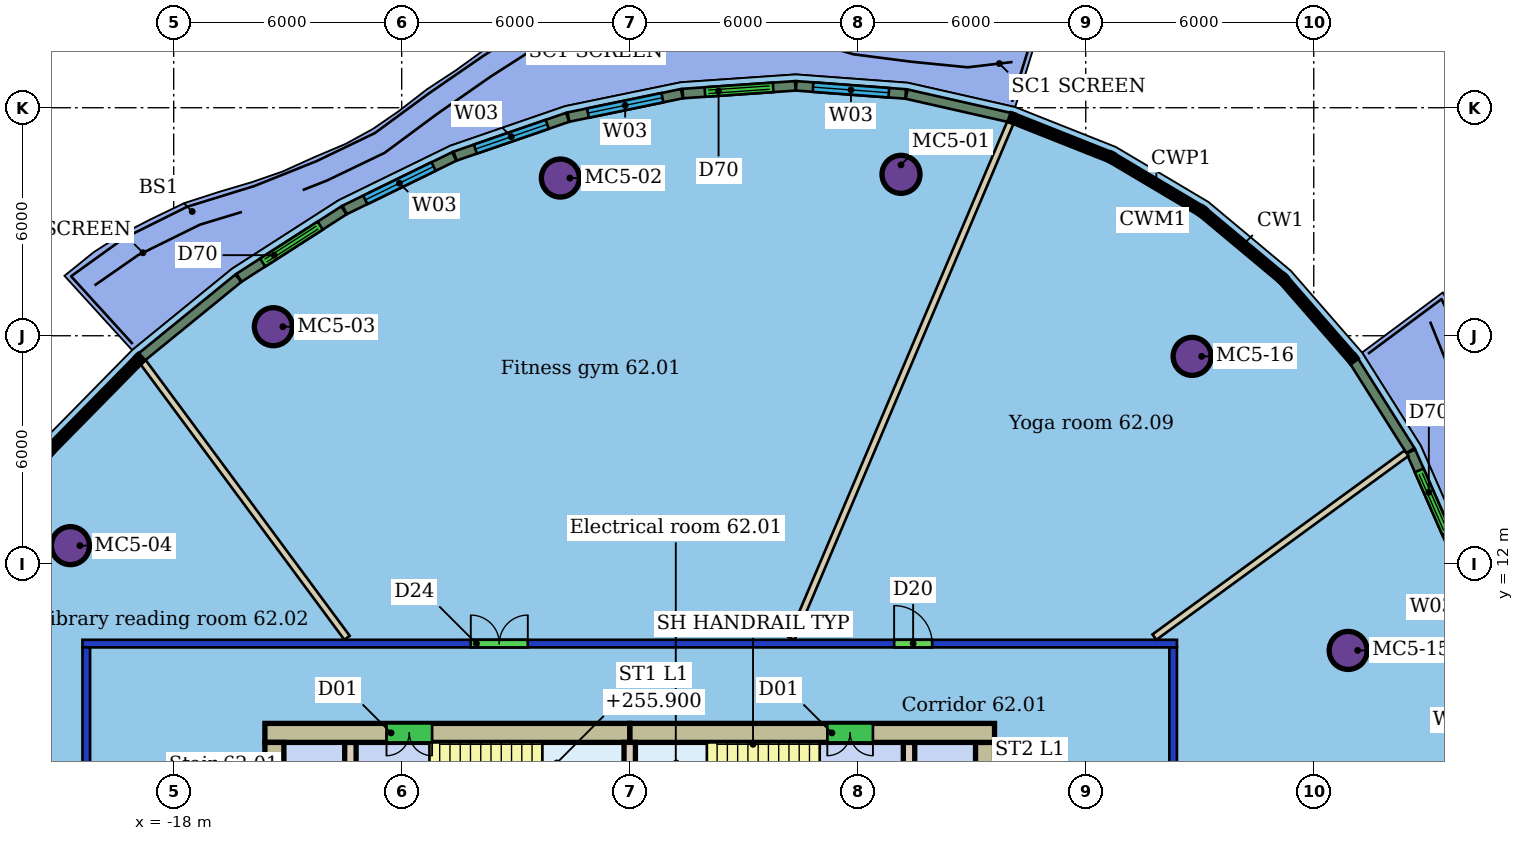
"""IFC4 building model, lengths in metres.
Left out: names, types, materials, properties, quantities, classifications, styles, units other than length and angle.
Written with IfcOpenShell. Run it as: python <this file> out.ifc"""

import sys

from ifc_helpers import new_model, si_unit, direction, frame, frame_2d, origin, origin_2d, place, context, subcontext, project, spatial, rectangle, hollow_circle, extrude, element, fill, save


model = new_model("IFC4")
c1 = context("Model", 3, precision=1e-05, world=origin(), true_north=direction((0.0, 1.0)))
c2 = subcontext(c1, "Body", "Model", "MODEL_VIEW")
j1 = project(units=[si_unit("LENGTHUNIT", "METRE"), si_unit("PLANEANGLEUNIT", "RADIAN")], contexts=[c1])
p1 = place(None, origin())
s1 = spatial("IfcSite", under=j1, at=p1, CompositionType="ELEMENT")
p2 = place(p1, origin())
s2 = spatial("IfcBuilding", under=s1, at=p2, CompositionType="ELEMENT")
p3 = place(p2, frame((0.0, 0.0, 254.1)))
s3 = spatial("IfcBuildingStorey", under=s2, at=p3, CompositionType="ELEMENT", Elevation=254.1)
for number, where, z_axis, x_axis in (
    (1, (1.138, 22.247, 0.0), (0.0, 0.0, 1.0), (1.0, 0.0, 0.0)),
    (2, (-7.825, 22.149, 0.0), (0.0, 0.0, 1.0), (1.0, 0.0, 0.0)),
    (3, (-15.377, 18.238, 0.0), (0.0, 0.0, 1.0), (1.0, 0.0, 0.0)),
    (4, (-20.718, 12.477, 0.0), (0.0, 0.0, 1.0), (1.0, 0.0, 0.0)),
    (5, (12.906, 9.72, 0.0), (0.0, 0.0, 1.0), (1.0, 0.0, 0.0)),
    (6, (8.8, 17.457, 0.0), (0.0, 0.0, 1.0), (1.0, 0.0, 0.0)),
):
    element("IfcColumn", number, at=place(p3, frame(where, z_axis=z_axis, x_axis=x_axis)), inside=s3, PredefinedType="COLUMN", context=c2, shape_type="SweptSolid", body=[
        extrude(hollow_circle(Radius=0.5, WallThickness=0.04, at=origin_2d()), origin(), (0.0, 0.0, 1.0), 3.45),
    ])
p4 = place(p3, frame((-20.3, -9.8, 0.0), z_axis=(0.0, 0.0, 1.0), x_axis=(0.0, 1.0, 0.0)))
e7 = element("IfcWall", 7, at=p4, inside=s3, PredefinedType="PARTITIONING", context=c2, shape_type="SweptSolid", body=[
    extrude(rectangle(XDim=19.6, YDim=0.2, at=frame_2d((9.8, 0.0))), origin(), (0.0, 0.0, 1.0), 3.1),
])
p5 = place(p4, frame((14.022, 0.0, 0.0)))
e8 = element("IfcOpeningElement", 8, at=p5, cuts=e7, PredefinedType="OPENING", context=c2, shape_type="SweptSolid", body=[
    extrude(rectangle(XDim=1.5, YDim=2.1, at=frame_2d((0.75, 1.05))), frame((0.0, 0.11, 0.0), z_axis=(0.0, -1.0, 0.0), x_axis=(1.0, 0.0, 0.0)), (0.0, 0.0, 1.0), 0.22),
])
p6 = place(p4, frame((6.812, 0.0, 0.0)))
e9 = element("IfcOpeningElement", 9, at=p6, cuts=e7, PredefinedType="OPENING", context=c2, shape_type="SweptSolid", body=[
    extrude(rectangle(XDim=1.8, YDim=2.4, at=frame_2d((0.9, 1.2))), frame((0.0, 0.11, 0.0), z_axis=(0.0, -1.0, 0.0), x_axis=(1.0, 0.0, 0.0)), (0.0, 0.0, 1.0), 0.22),
])
p7 = place(p3, frame((-20.4, 9.9, 0.0), z_axis=(0.0, 0.0, 1.0), x_axis=(1.0, 0.0, 0.0)))
e10 = element("IfcWall", 10, at=p7, inside=s3, PredefinedType="PARTITIONING", context=c2, shape_type="SweptSolid", body=[
    extrude(rectangle(XDim=28.8, YDim=0.2, at=frame_2d((14.4, 0.0))), origin(), (0.0, 0.0, 1.0), 3.1),
])
p8 = place(p7, frame((10.218, 0.0, 0.0)))
e11 = element("IfcOpeningElement", 11, at=p8, cuts=e10, PredefinedType="OPENING", context=c2, shape_type="SweptSolid", body=[
    extrude(rectangle(XDim=1.5, YDim=2.1, at=frame_2d((0.75, 1.05))), frame((0.0, 0.11, 0.0), z_axis=(0.0, -1.0, 0.0), x_axis=(1.0, 0.0, 0.0)), (0.0, 0.0, 1.0), 0.22),
])
p9 = place(p7, frame((21.358, 0.0, 0.0)))
e12 = element("IfcOpeningElement", 12, at=p9, cuts=e10, PredefinedType="OPENING", context=c2, shape_type="SweptSolid", body=[
    extrude(rectangle(XDim=1.0, YDim=2.1, at=frame_2d((0.5, 1.05))), frame((0.0, 0.11, 0.0), z_axis=(0.0, -1.0, 0.0), x_axis=(1.0, 0.0, 0.0)), (0.0, 0.0, 1.0), 0.22),
])
p10 = place(p3, frame((8.3, 9.8, 0.0), z_axis=(0.0, 0.0, 1.0), x_axis=(0.0, -1.0, 0.0)))
e13 = element("IfcWall", 13, at=p10, inside=s3, PredefinedType="PARTITIONING", context=c2, shape_type="SweptSolid", body=[
    extrude(rectangle(XDim=19.6, YDim=0.2, at=frame_2d((9.8, 0.0))), origin(), (0.0, 0.0, 1.0), 3.1),
])
p11 = place(p10, frame((10.302, 0.0, 0.0)))
e14 = element("IfcOpeningElement", 14, at=p11, cuts=e13, PredefinedType="OPENING", context=c2, shape_type="SweptSolid", body=[
    extrude(rectangle(XDim=1.8, YDim=2.1, at=frame_2d((0.9, 1.05))), frame((0.0, 0.11, 0.0), z_axis=(0.0, -1.0, 0.0), x_axis=(1.0, 0.0, 0.0)), (0.0, 0.0, 1.0), 0.22),
])
p12 = place(p3, frame((4.018, 23.611, 0.0), z_axis=(0.0, 0.0, 1.0), x_axis=(-0.390584280832, -0.920567172762, 0.0)))
e15 = element("IfcWall", 15, at=p12, inside=s3, PredefinedType="PARTITIONING", context=c2, shape_type="SweptSolid", body=[
    extrude(rectangle(XDim=14.748, YDim=0.175, at=frame_2d((7.374, 0.0))), origin(), (0.0, 0.0, 1.0), 3.45),
])
p13 = place(p3, frame((-18.807, 17.308, 0.0), z_axis=(0.0, 0.0, 1.0), x_axis=(0.594811545717, -0.803865178423, 0.0)))
e16 = element("IfcWall", 16, at=p13, inside=s3, PredefinedType="PARTITIONING", context=c2, shape_type="SweptSolid", body=[
    extrude(rectangle(XDim=9.026, YDim=0.175, at=frame_2d((4.513, 0.0))), origin(), (0.0, 0.0, 1.0), 3.45),
])
p14 = place(p3, frame((14.44, 14.909, 0.0), z_axis=(0.0, 0.0, 1.0), x_axis=(-0.807914917883, -0.589299147685, 0.0)))
e17 = element("IfcWall", 17, at=p14, inside=s3, PredefinedType="PARTITIONING", context=c2, shape_type="SweptSolid", body=[
    extrude(rectangle(XDim=8.21, YDim=0.175, at=frame_2d((4.105, 0.0))), origin(), (0.0, 0.0, 1.0), 3.45),
])
p15 = place(p3, frame((4.001, 23.743, 0.0), z_axis=(0.0, 0.0, 1.0), x_axis=(-0.975244788098, 0.221128024654, 0.0)))
e18 = element("IfcWall", 18, at=p15, inside=s3, PredefinedType="SOLIDWALL", context=c2, shape_type="SweptSolid", body=[
    extrude(rectangle(XDim=2.782, YDim=0.25, at=frame_2d((1.391, 0.0))), origin(), (0.0, 0.0, 1.0), 3.15),
])
p16 = place(p3, frame((1.261, 24.362, 0.0), z_axis=(0.0, 0.0, 1.0), x_axis=(-0.997260599476, 0.073968214338, 0.0)))
e19 = element("IfcWall", 19, at=p16, inside=s3, PredefinedType="SOLIDWALL", context=c2, shape_type="SweptSolid", body=[
    extrude(rectangle(XDim=2.888, YDim=0.25, at=frame_2d((1.444, 0.0))), origin(), (0.0, 0.0, 1.0), 3.15),
])
p17 = place(p16, frame((0.444, 0.0, 0.9)))
e20 = element("IfcOpeningElement", 20, at=p17, cuts=e19, PredefinedType="OPENING", context=c2, shape_type="SweptSolid", body=[
    extrude(rectangle(XDim=2.0, YDim=2.1, at=frame_2d((1.0, 1.05))), frame((0.0, 0.135, 0.0), z_axis=(0.0, -1.0, 0.0), x_axis=(1.0, 0.0, 0.0)), (0.0, 0.0, 1.0), 0.27),
])
p18 = place(p3, frame((-1.645, 24.575, 0.0), z_axis=(0.0, 0.0, 1.0), x_axis=(-0.99766702353, -0.068267929221, 0.0)))
e21 = element("IfcWall", 21, at=p18, inside=s3, PredefinedType="SOLIDWALL", context=c2, shape_type="SweptSolid", body=[
    extrude(rectangle(XDim=2.965, YDim=0.25, at=frame_2d((1.482, 0.0))), origin(), (0.0, 0.0, 1.0), 3.15),
])
p19 = place(p18, frame((0.582, 0.0, 0.0)))
e22 = element("IfcOpeningElement", 22, at=p19, cuts=e21, PredefinedType="OPENING", context=c2, shape_type="SweptSolid", body=[
    extrude(rectangle(XDim=1.8, YDim=2.4, at=frame_2d((0.9, 1.2))), frame((0.0, 0.135, 0.0), z_axis=(0.0, -1.0, 0.0), x_axis=(1.0, 0.0, 0.0)), (0.0, 0.0, 1.0), 0.27),
])
p20 = place(p3, frame((-4.627, 24.37, 0.0), z_axis=(0.0, 0.0, 1.0), x_axis=(-0.979363870878, -0.202104944072, 0.0)))
e23 = element("IfcWall", 23, at=p20, inside=s3, PredefinedType="SOLIDWALL", context=c2, shape_type="SweptSolid", body=[
    extrude(rectangle(XDim=3.048, YDim=0.25, at=frame_2d((1.524, 0.0))), origin(), (0.0, 0.0, 1.0), 3.15),
])
p21 = place(p20, frame((0.524, 0.0, 0.9)))
e24 = element("IfcOpeningElement", 24, at=p21, cuts=e23, PredefinedType="OPENING", context=c2, shape_type="SweptSolid", body=[
    extrude(rectangle(XDim=2.0, YDim=2.1, at=frame_2d((1.0, 1.05))), frame((0.0, 0.135, 0.0), z_axis=(0.0, -1.0, 0.0), x_axis=(1.0, 0.0, 0.0)), (0.0, 0.0, 1.0), 0.27),
])
p22 = place(p3, frame((-7.635, 23.747, 0.0), z_axis=(0.0, 0.0, 1.0), x_axis=(-0.945414397725, -0.325870551867, 0.0)))
e25 = element("IfcWall", 25, at=p22, inside=s3, PredefinedType="SOLIDWALL", context=c2, shape_type="SweptSolid", body=[
    extrude(rectangle(XDim=3.132, YDim=0.25, at=frame_2d((1.566, 0.0))), origin(), (0.0, 0.0, 1.0), 3.15),
])
p23 = place(p22, frame((0.566, 0.0, 0.9)))
e26 = element("IfcOpeningElement", 26, at=p23, cuts=e25, PredefinedType="OPENING", context=c2, shape_type="SweptSolid", body=[
    extrude(rectangle(XDim=2.0, YDim=2.1, at=frame_2d((1.0, 1.05))), frame((0.0, 0.135, 0.0), z_axis=(0.0, -1.0, 0.0), x_axis=(1.0, 0.0, 0.0)), (0.0, 0.0, 1.0), 0.27),
])
p24 = place(p3, frame((-10.617, 22.718, 0.0), z_axis=(0.0, 0.0, 1.0), x_axis=(-0.898675594267, -0.438613926214, 0.0)))
e27 = element("IfcWall", 27, at=p24, inside=s3, PredefinedType="SOLIDWALL", context=c2, shape_type="SweptSolid", body=[
    extrude(rectangle(XDim=3.21, YDim=0.25, at=frame_2d((1.605, 0.0))), origin(), (0.0, 0.0, 1.0), 3.15),
])
p25 = place(p24, frame((0.605, 0.0, 0.9)))
e28 = element("IfcOpeningElement", 28, at=p25, cuts=e27, PredefinedType="OPENING", context=c2, shape_type="SweptSolid", body=[
    extrude(rectangle(XDim=2.0, YDim=2.1, at=frame_2d((1.0, 1.05))), frame((0.0, 0.135, 0.0), z_axis=(0.0, -1.0, 0.0), x_axis=(1.0, 0.0, 0.0)), (0.0, 0.0, 1.0), 0.27),
])
p26 = place(p3, frame((-13.522, 21.299, 0.0), z_axis=(0.0, 0.0, 1.0), x_axis=(-0.841357447224, -0.540479089328, 0.0)))
e29 = element("IfcWall", 29, at=p26, inside=s3, PredefinedType="SOLIDWALL", context=c2, shape_type="SweptSolid", body=[
    extrude(rectangle(XDim=3.279, YDim=0.25, at=frame_2d((1.64, 0.0))), origin(), (0.0, 0.0, 1.0), 3.15),
])
p27 = place(p26, frame((0.74, 0.0, 0.0)))
e30 = element("IfcOpeningElement", 30, at=p27, cuts=e29, PredefinedType="OPENING", context=c2, shape_type="SweptSolid", body=[
    extrude(rectangle(XDim=1.8, YDim=2.4, at=frame_2d((0.9, 1.2))), frame((0.0, 0.135, 0.0), z_axis=(0.0, -1.0, 0.0), x_axis=(1.0, 0.0, 0.0)), (0.0, 0.0, 1.0), 0.27),
])
p28 = place(p3, frame((-16.298, 19.513, 0.0), z_axis=(0.0, 0.0, 1.0), x_axis=(-0.775212105866, -0.631701029696, 0.0)))
e31 = element("IfcWall", 31, at=p28, inside=s3, PredefinedType="SOLIDWALL", context=c2, shape_type="SweptSolid", body=[
    extrude(rectangle(XDim=3.29, YDim=0.25, at=frame_2d((1.645, 0.0))), origin(), (0.0, 0.0, 1.0), 3.15),
])
p29 = place(p3, frame((15.716, 12.311, 0.0), z_axis=(0.0, 0.0, 1.0), x_axis=(-0.401639105758, 0.915798028348, 0.0)))
e32 = element("IfcWall", 32, at=p29, inside=s3, PredefinedType="SOLIDWALL", context=c2, shape_type="SweptSolid", body=[
    extrude(rectangle(XDim=2.888, YDim=0.25, at=frame_2d((1.444, 0.0))), origin(), (0.0, 0.0, 1.0), 3.15),
])
p30 = place(p29, frame((0.544, 0.0, 0.0)))
e33 = element("IfcOpeningElement", 33, at=p30, cuts=e32, PredefinedType="OPENING", context=c2, shape_type="SweptSolid", body=[
    extrude(rectangle(XDim=1.8, YDim=2.4, at=frame_2d((0.9, 1.2))), frame((0.0, 0.135, 0.0), z_axis=(0.0, -1.0, 0.0), x_axis=(1.0, 0.0, 0.0)), (0.0, 0.0, 1.0), 0.27),
])
p31 = place(p3, frame((14.544, 14.979, 0.0), z_axis=(0.0, 0.0, 1.0), x_axis=(-0.533094811272, 0.846055507751, 0.0)))
e34 = element("IfcWall", 34, at=p31, inside=s3, PredefinedType="SOLIDWALL", context=c2, shape_type="SweptSolid", body=[
    extrude(rectangle(XDim=2.783, YDim=0.25, at=frame_2d((1.391, 0.0))), origin(), (0.0, 0.0, 1.0), 3.15),
])
p32 = place(p3, frame((3.6, 7.55, 0.0), z_axis=(0.0, 0.0, 1.0), x_axis=(-1.0, 0.0, 0.0)))
e35 = element("IfcWall", 35, at=p32, inside=s3, PredefinedType="SHEAR", context=c2, shape_type="SweptSolid", body=[
    extrude(rectangle(XDim=9.6, YDim=0.5, at=frame_2d((4.8, 0.0))), origin(), (0.0, 0.0, 1.0), 3.3),
])
p33 = place(p32, frame((3.2, 0.0, 0.0)))
e36 = element("IfcOpeningElement", 36, at=p33, cuts=e35, PredefinedType="OPENING", context=c2, shape_type="SweptSolid", body=[
    extrude(rectangle(XDim=1.2, YDim=2.1, at=frame_2d((0.6, 1.05))), frame((0.0, 0.26, 0.0), z_axis=(0.0, -1.0, 0.0), x_axis=(1.0, 0.0, 0.0)), (0.0, 0.0, 1.0), 0.52),
])
p34 = place(p3, frame((-6.0, 7.55, 0.0), z_axis=(0.0, 0.0, 1.0), x_axis=(-1.0, 0.0, 0.0)))
e37 = element("IfcWall", 37, at=p34, inside=s3, PredefinedType="SHEAR", context=c2, shape_type="SweptSolid", body=[
    extrude(rectangle(XDim=9.6, YDim=0.5, at=frame_2d((4.8, 0.0))), origin(), (0.0, 0.0, 1.0), 3.3),
])
p35 = place(p34, frame((5.2, 0.0, 0.0)))
e38 = element("IfcOpeningElement", 38, at=p35, cuts=e37, PredefinedType="OPENING", context=c2, shape_type="SweptSolid", body=[
    extrude(rectangle(XDim=1.2, YDim=2.1, at=frame_2d((0.6, 1.05))), frame((0.0, 0.26, 0.0), z_axis=(0.0, -1.0, 0.0), x_axis=(1.0, 0.0, 0.0)), (0.0, 0.0, 1.0), 0.52),
])
p36 = place(p3, frame((-15.35, 7.3, 0.0), z_axis=(0.0, 0.0, 1.0), x_axis=(0.0, -1.0, 0.0)))
e39 = element("IfcWall", 39, at=p36, inside=s3, PredefinedType="SHEAR", context=c2, shape_type="SweptSolid", body=[
    extrude(rectangle(XDim=14.6, YDim=0.5, at=frame_2d((7.3, 0.0))), origin(), (0.0, 0.0, 1.0), 3.3),
])
p37 = place(p36, frame((10.6, 0.0, 0.0)))
e40 = element("IfcOpeningElement", 40, at=p37, cuts=e39, PredefinedType="OPENING", context=c2, shape_type="SweptSolid", body=[
    extrude(rectangle(XDim=1.2, YDim=2.1, at=frame_2d((0.6, 1.05))), frame((0.0, 0.26, 0.0), z_axis=(0.0, -1.0, 0.0), x_axis=(1.0, 0.0, 0.0)), (0.0, 0.0, 1.0), 0.52),
])
p38 = place(p36, frame((2.8, 0.0, 0.0)))
e41 = element("IfcOpeningElement", 41, at=p38, cuts=e39, PredefinedType="OPENING", context=c2, shape_type="SweptSolid", body=[
    extrude(rectangle(XDim=1.2, YDim=2.1, at=frame_2d((0.6, 1.05))), frame((0.0, 0.26, 0.0), z_axis=(0.0, -1.0, 0.0), x_axis=(1.0, 0.0, 0.0)), (0.0, 0.0, 1.0), 0.52),
])
p39 = place(p3, frame((3.35, -7.3, 0.0), z_axis=(0.0, 0.0, 1.0), x_axis=(0.0, 1.0, 0.0)))
e42 = element("IfcWall", 42, at=p39, inside=s3, PredefinedType="SHEAR", context=c2, shape_type="SweptSolid", body=[
    extrude(rectangle(XDim=14.6, YDim=0.5, at=frame_2d((7.3, 0.0))), origin(), (0.0, 0.0, 1.0), 3.3),
])
p40 = place(p39, frame((2.8, 0.0, 0.0)))
e43 = element("IfcOpeningElement", 43, at=p40, cuts=e42, PredefinedType="OPENING", context=c2, shape_type="SweptSolid", body=[
    extrude(rectangle(XDim=1.2, YDim=2.1, at=frame_2d((0.6, 1.05))), frame((0.0, 0.26, 0.0), z_axis=(0.0, -1.0, 0.0), x_axis=(1.0, 0.0, 0.0)), (0.0, 0.0, 1.0), 0.52),
])
p41 = place(p39, frame((10.6, 0.0, 0.0)))
e44 = element("IfcOpeningElement", 44, at=p41, cuts=e42, PredefinedType="OPENING", context=c2, shape_type="SweptSolid", body=[
    extrude(rectangle(XDim=1.2, YDim=2.1, at=frame_2d((0.6, 1.05))), frame((0.0, 0.26, 0.0), z_axis=(0.0, -1.0, 0.0), x_axis=(1.0, 0.0, 0.0)), (0.0, 0.0, 1.0), 0.52),
])
p42 = place(p3, frame((-13.35, 7.3, 0.0), z_axis=(0.0, 0.0, 1.0), x_axis=(0.0, -1.0, 0.0)))
e45 = element("IfcWall", 45, at=p42, inside=s3, PredefinedType="SHEAR", context=c2, shape_type="SweptSolid", body=[
    extrude(rectangle(XDim=14.6, YDim=0.3, at=frame_2d((7.3, 0.0))), origin(), (0.0, 0.0, 1.0), 3.3),
])
p43 = place(p42, frame((6.55, 0.0, 0.0)))
e46 = element("IfcOpeningElement", 46, at=p43, cuts=e45, PredefinedType="OPENING", context=c2, shape_type="SweptSolid", body=[
    extrude(rectangle(XDim=1.5, YDim=2.1, at=frame_2d((0.75, 1.05))), frame((0.0, 0.16, 0.0), z_axis=(0.0, -1.0, 0.0), x_axis=(1.0, 0.0, 0.0)), (0.0, 0.0, 1.0), 0.32),
])
p44 = place(p3, frame((1.35, -7.3, 0.0), z_axis=(0.0, 0.0, 1.0), x_axis=(0.0, 1.0, 0.0)))
e47 = element("IfcWall", 47, at=p44, inside=s3, PredefinedType="SHEAR", context=c2, shape_type="SweptSolid", body=[
    extrude(rectangle(XDim=14.6, YDim=0.3, at=frame_2d((7.3, 0.0))), origin(), (0.0, 0.0, 1.0), 3.3),
])
p45 = place(p44, frame((1.21, 0.0, 0.0)))
e48 = element("IfcOpeningElement", 48, at=p45, cuts=e47, PredefinedType="OPENING", context=c2, shape_type="SweptSolid", body=[
    extrude(rectangle(XDim=1.0, YDim=2.1, at=frame_2d((0.5, 1.05))), frame((0.0, 0.16, 0.0), z_axis=(0.0, -1.0, 0.0), x_axis=(1.0, 0.0, 0.0)), (0.0, 0.0, 1.0), 0.32),
])
p46 = place(p44, frame((6.55, 0.0, 0.0)))
e49 = element("IfcOpeningElement", 49, at=p46, cuts=e47, PredefinedType="OPENING", context=c2, shape_type="SweptSolid", body=[
    extrude(rectangle(XDim=1.5, YDim=2.1, at=frame_2d((0.75, 1.05))), frame((0.0, 0.16, 0.0), z_axis=(0.0, -1.0, 0.0), x_axis=(1.0, 0.0, 0.0)), (0.0, 0.0, 1.0), 0.32),
])
p47 = place(p3, frame((-6.0, 3.88, 0.0), z_axis=(0.0, 0.0, 1.0), x_axis=(0.0, 1.0, 0.0)))
e50 = element("IfcWall", 50, at=p47, inside=s3, PredefinedType="SHEAR", context=c2, shape_type="SweptSolid", body=[
    extrude(rectangle(XDim=3.42, YDim=0.3, at=frame_2d((1.71, 0.0))), origin(), (0.0, 0.0, 1.0), 3.3),
])
p48 = place(p8, origin())
e51 = element("IfcDoor", 51, at=p48, inside=s3, OperationType="DOUBLE_DOOR_SINGLE_SWING", PredefinedType="DOOR", context=c2, shape_type="SweptSolid", body=[
    extrude(rectangle(XDim=1.5, YDim=2.1, at=frame_2d((0.75, 1.05))), frame((0.0, 0.025, 0.0), z_axis=(0.0, -1.0, 0.0), x_axis=(1.0, 0.0, 0.0)), (0.0, 0.0, 1.0), 0.05),
])
fill(e11, e51)
p49 = place(p9, origin())
e52 = element("IfcDoor", 52, at=p49, inside=s3, OperationType="SINGLE_SWING_LEFT", PredefinedType="DOOR", context=c2, shape_type="SweptSolid", body=[
    extrude(rectangle(XDim=1.0, YDim=2.1, at=frame_2d((0.5, 1.05))), frame((0.0, 0.025, 0.0), z_axis=(0.0, -1.0, 0.0), x_axis=(1.0, 0.0, 0.0)), (0.0, 0.0, 1.0), 0.05),
])
fill(e12, e52)
p50 = place(p17, origin())
e53 = element("IfcWindow", 53, at=p50, inside=s3, PartitioningType="SINGLE_PANEL", PredefinedType="WINDOW", context=c2, shape_type="SweptSolid", body=[
    extrude(rectangle(XDim=2.0, YDim=2.1, at=frame_2d((1.0, 1.05))), frame((0.0, 0.03, 0.0), z_axis=(0.0, -1.0, 0.0), x_axis=(1.0, 0.0, 0.0)), (0.0, 0.0, 1.0), 0.06),
])
fill(e20, e53)
p51 = place(p19, origin())
e54 = element("IfcDoor", 54, at=p51, inside=s3, OperationType="DOUBLE_DOOR_SLIDING", PredefinedType="DOOR", context=c2, shape_type="SweptSolid", body=[
    extrude(rectangle(XDim=1.8, YDim=2.4, at=frame_2d((0.9, 1.2))), frame((0.0, 0.025, 0.0), z_axis=(0.0, -1.0, 0.0), x_axis=(1.0, 0.0, 0.0)), (0.0, 0.0, 1.0), 0.05),
])
fill(e22, e54)
p52 = place(p21, origin())
e55 = element("IfcWindow", 55, at=p52, inside=s3, PartitioningType="SINGLE_PANEL", PredefinedType="WINDOW", context=c2, shape_type="SweptSolid", body=[
    extrude(rectangle(XDim=2.0, YDim=2.1, at=frame_2d((1.0, 1.05))), frame((0.0, 0.03, 0.0), z_axis=(0.0, -1.0, 0.0), x_axis=(1.0, 0.0, 0.0)), (0.0, 0.0, 1.0), 0.06),
])
fill(e24, e55)
p53 = place(p23, origin())
e56 = element("IfcWindow", 56, at=p53, inside=s3, PartitioningType="SINGLE_PANEL", PredefinedType="WINDOW", context=c2, shape_type="SweptSolid", body=[
    extrude(rectangle(XDim=2.0, YDim=2.1, at=frame_2d((1.0, 1.05))), frame((0.0, 0.03, 0.0), z_axis=(0.0, -1.0, 0.0), x_axis=(1.0, 0.0, 0.0)), (0.0, 0.0, 1.0), 0.06),
])
fill(e26, e56)
p54 = place(p25, origin())
e57 = element("IfcWindow", 57, at=p54, inside=s3, PartitioningType="SINGLE_PANEL", PredefinedType="WINDOW", context=c2, shape_type="SweptSolid", body=[
    extrude(rectangle(XDim=2.0, YDim=2.1, at=frame_2d((1.0, 1.05))), frame((0.0, 0.03, 0.0), z_axis=(0.0, -1.0, 0.0), x_axis=(1.0, 0.0, 0.0)), (0.0, 0.0, 1.0), 0.06),
])
fill(e28, e57)
p55 = place(p27, origin())
e58 = element("IfcDoor", 58, at=p55, inside=s3, OperationType="DOUBLE_DOOR_SLIDING", PredefinedType="DOOR", context=c2, shape_type="SweptSolid", body=[
    extrude(rectangle(XDim=1.8, YDim=2.4, at=frame_2d((0.9, 1.2))), frame((0.0, 0.025, 0.0), z_axis=(0.0, -1.0, 0.0), x_axis=(1.0, 0.0, 0.0)), (0.0, 0.0, 1.0), 0.05),
])
fill(e30, e58)
p56 = place(p30, origin())
e59 = element("IfcDoor", 59, at=p56, inside=s3, OperationType="DOUBLE_DOOR_SLIDING", PredefinedType="DOOR", context=c2, shape_type="SweptSolid", body=[
    extrude(rectangle(XDim=1.8, YDim=2.4, at=frame_2d((0.9, 1.2))), frame((0.0, 0.025, 0.0), z_axis=(0.0, -1.0, 0.0), x_axis=(1.0, 0.0, 0.0)), (0.0, 0.0, 1.0), 0.05),
])
fill(e33, e59)
p57 = place(p33, origin())
e60 = element("IfcDoor", 60, at=p57, inside=s3, OperationType="DOUBLE_DOOR_SINGLE_SWING", PredefinedType="NOTDEFINED", context=c2, shape_type="SweptSolid", body=[
    extrude(rectangle(XDim=1.2, YDim=2.1, at=frame_2d((0.6, 1.05))), frame((0.0, 0.025, 0.0), z_axis=(0.0, -1.0, 0.0), x_axis=(1.0, 0.0, 0.0)), (0.0, 0.0, 1.0), 0.05),
])
fill(e36, e60)
p58 = place(p35, origin())
e61 = element("IfcDoor", 61, at=p58, inside=s3, OperationType="DOUBLE_DOOR_SINGLE_SWING", PredefinedType="NOTDEFINED", context=c2, shape_type="SweptSolid", body=[
    extrude(rectangle(XDim=1.2, YDim=2.1, at=frame_2d((0.6, 1.05))), frame((0.0, 0.025, 0.0), z_axis=(0.0, -1.0, 0.0), x_axis=(1.0, 0.0, 0.0)), (0.0, 0.0, 1.0), 0.05),
])
fill(e38, e61)
save(model, sys.argv[1])
